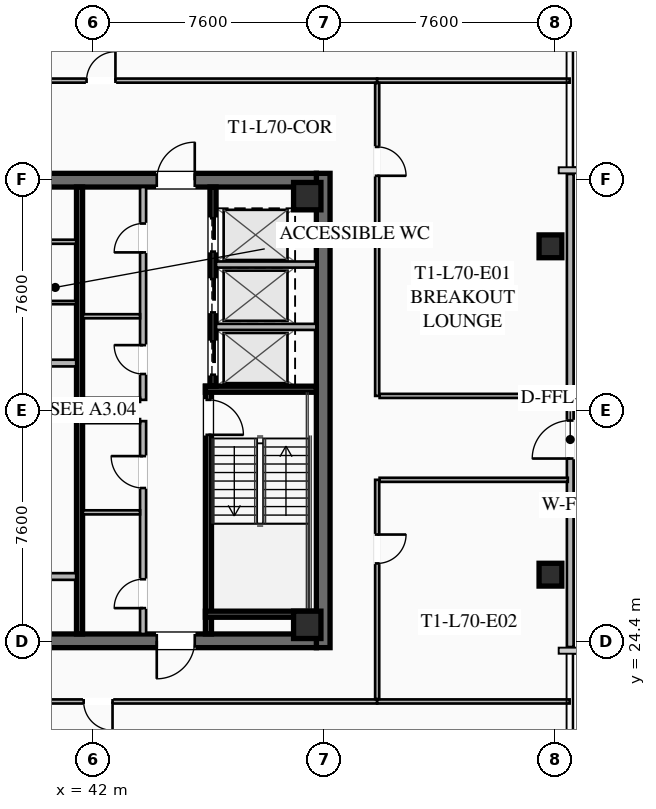
"""IFC4 building model, lengths in metres.
Left out: names, types, materials, properties, quantities, classifications, styles, units other than length and angle.
Written with IfcOpenShell. Run it as: python <this file> out.ifc"""

import sys

from ifc_helpers import new_model, si_unit, direction, frame, frame_2d, origin, origin_2d, place, context, subcontext, project, spatial, rectangle, hollow_rectangle, extrude, element, fill, save


model = new_model("IFC4")
c1 = context("Model", 3, precision=1e-05, world=origin(), true_north=direction((0.0, 1.0)))
c2 = subcontext(c1, "Body", "Model", "MODEL_VIEW")
j1 = project(units=[si_unit("LENGTHUNIT", "METRE"), si_unit("PLANEANGLEUNIT", "RADIAN")], contexts=[c1])
p1 = place(None, origin())
s1 = spatial("IfcSite", under=j1, at=p1, CompositionType="ELEMENT")
p2 = place(p1, origin())
s2 = spatial("IfcBuilding", under=s1, at=p2, CompositionType="ELEMENT")
p3 = place(p2, frame((0.0, 0.0, 259.4)))
s3 = spatial("IfcBuildingStorey", under=s2, at=p3, CompositionType="ELEMENT", Elevation=259.4)
p4 = place(p3, frame((49.575, 39.8, 0.0), z_axis=(0.0, 0.0, 1.0), x_axis=(0.0, -1.0, 0.0)))
e1 = element("IfcWall", 1, at=p4, inside=s3, PredefinedType="SHEAR", context=c2, shape_type="SweptSolid", body=[
    extrude(rectangle(XDim=15.6, YDim=0.45, at=frame_2d((7.8, 0.0))), origin(), (0.0, 0.0, 1.0), 4.0),
])
p5 = place(p3, frame((49.35, 24.425, 0.0), z_axis=(0.0, 0.0, 1.0), x_axis=(-1.0, 0.0, 0.0)))
e2 = element("IfcWall", 2, at=p5, inside=s3, PredefinedType="SHEAR", context=c2, shape_type="SweptSolid", body=[
    extrude(rectangle(XDim=14.7, YDim=0.45, at=frame_2d((7.35, 0.0))), origin(), (0.0, 0.0, 1.0), 4.0),
])
p6 = place(p5, frame((9.05, 0.0, 0.0)))
e3 = element("IfcOpeningElement", 3, at=p6, cuts=e2, PredefinedType="OPENING", context=c2, shape_type="SweptSolid", body=[
    extrude(rectangle(XDim=1.25, YDim=2.25, at=frame_2d((0.625, 1.125))), frame((0.0, 0.235, 0.0), z_axis=(0.0, -1.0, 0.0), x_axis=(1.0, 0.0, 0.0)), (0.0, 0.0, 1.0), 0.47),
])
p7 = place(p5, frame((4.0, 0.0, 0.0)))
e4 = element("IfcOpeningElement", 4, at=p7, cuts=e2, PredefinedType="OPENING", context=c2, shape_type="SweptSolid", body=[
    extrude(rectangle(XDim=1.25, YDim=2.25, at=frame_2d((0.625, 1.125))), frame((0.0, 0.235, 0.0), z_axis=(0.0, -1.0, 0.0), x_axis=(1.0, 0.0, 0.0)), (0.0, 0.0, 1.0), 0.47),
])
p8 = place(p3, frame((34.65, 39.575, 0.0), z_axis=(0.0, 0.0, 1.0), x_axis=(1.0, 0.0, 0.0)))
e5 = element("IfcWall", 5, at=p8, inside=s3, PredefinedType="SHEAR", context=c2, shape_type="SweptSolid", body=[
    extrude(rectangle(XDim=14.7, YDim=0.45, at=frame_2d((7.35, 0.0))), origin(), (0.0, 0.0, 1.0), 4.0),
])
p9 = place(p8, frame((4.4, 0.0, 0.0)))
e6 = element("IfcOpeningElement", 6, at=p9, cuts=e5, PredefinedType="OPENING", context=c2, shape_type="SweptSolid", body=[
    extrude(rectangle(XDim=1.25, YDim=2.25, at=frame_2d((0.625, 1.125))), frame((0.0, 0.235, 0.0), z_axis=(0.0, -1.0, 0.0), x_axis=(1.0, 0.0, 0.0)), (0.0, 0.0, 1.0), 0.47),
])
p10 = place(p8, frame((9.45, 0.0, 0.0)))
e7 = element("IfcOpeningElement", 7, at=p10, cuts=e5, PredefinedType="OPENING", context=c2, shape_type="SweptSolid", body=[
    extrude(rectangle(XDim=1.25, YDim=2.25, at=frame_2d((0.625, 1.125))), frame((0.0, 0.235, 0.0), z_axis=(0.0, -1.0, 0.0), x_axis=(1.0, 0.0, 0.0)), (0.0, 0.0, 1.0), 0.47),
])
for number, where, z_axis, x_axis in (
    (8, (49.05, 24.95, 0.0), (0.0, 0.0, 1.0), (1.0, 0.0, 0.0)),
    (9, (49.05, 39.05, 0.0), (0.0, 0.0, 1.0), (1.0, 0.0, 0.0)),
):
    element("IfcColumn", number, at=place(p3, frame(where, z_axis=z_axis, x_axis=x_axis)), inside=s3, PredefinedType="COLUMN", context=c2, shape_type="SweptSolid", body=[
        extrude(hollow_rectangle(XDim=0.9, YDim=0.9, WallThickness=0.04, at=origin_2d()), origin(), (0.0, 0.0, 1.0), 3.7),
    ])
for number, where, z_axis, x_axis in (
    (10, (57.05, 26.6, 0.0), (0.0, 0.0, 1.0), (1.0, 0.0, 0.0)),
    (11, (57.05, 37.4, 0.0), (0.0, 0.0, 1.0), (1.0, 0.0, 0.0)),
):
    element("IfcColumn", number, at=place(p3, frame(where, z_axis=z_axis, x_axis=x_axis)), inside=s3, PredefinedType="COLUMN", context=c2, shape_type="SweptSolid", body=[
        extrude(hollow_rectangle(XDim=0.75, YDim=0.75, WallThickness=0.032, at=origin_2d()), origin(), (0.0, 0.0, 1.0), 3.7),
    ])
p11 = place(p3, frame((57.7, 24.22, 0.0), z_axis=(0.0, 0.0, 1.0), x_axis=(0.0, 1.0, 0.0)))
e12 = element("IfcWall", 12, at=p11, inside=s3, PredefinedType="SOLIDWALL", context=c2, shape_type="SweptSolid", body=[
    extrude(rectangle(XDim=15.56, YDim=0.22, at=frame_2d((7.78, 0.0))), origin(), (0.0, 0.0, 1.0), 2.659),
])
p12 = place(p11, frame((6.2, 0.0, 0.0)))
e13 = element("IfcOpeningElement", 13, at=p12, cuts=e12, PredefinedType="OPENING", context=c2, shape_type="SweptSolid", body=[
    extrude(rectangle(XDim=1.25, YDim=2.25, at=frame_2d((0.625, 1.125))), frame((0.0, 0.12, 0.0), z_axis=(0.0, -1.0, 0.0), x_axis=(1.0, 0.0, 0.0)), (0.0, 0.0, 1.0), 0.24),
])
p13 = place(p3, frame((45.8, 32.8, 0.0), z_axis=(0.0, 0.0, 1.0), x_axis=(0.0, -1.0, 0.0)))
e14 = element("IfcWall", 14, at=p13, inside=s3, PredefinedType="SHEAR", context=c2, shape_type="SweptSolid", body=[
    extrude(rectangle(XDim=8.15, YDim=0.2, at=frame_2d((4.075, 0.0))), origin(), (0.0, 0.0, 1.0), 3.7),
])
p14 = place(p13, frame((0.45, 0.0, 0.0)))
e15 = element("IfcOpeningElement", 15, at=p14, cuts=e14, PredefinedType="OPENING", context=c2, shape_type="SweptSolid", body=[
    extrude(rectangle(XDim=1.15, YDim=2.2, at=frame_2d((0.575, 1.1))), frame((0.0, 0.11, 0.0), z_axis=(0.0, -1.0, 0.0), x_axis=(1.0, 0.0, 0.0)), (0.0, 0.0, 1.0), 0.22),
])
for number, where, z_axis, x_axis in (
    (16, (45.7, 32.7, 0.0), (0.0, 0.0, 1.0), (1.0, 0.0, 0.0)),
    (17, (45.7, 25.3, 0.0), (0.0, 0.0, 1.0), (1.0, 0.0, 0.0)),
):
    element("IfcWall", number, at=place(p3, frame(where, z_axis=z_axis, x_axis=x_axis)), inside=s3, PredefinedType="SHEAR", context=c2, shape_type="SweptSolid", body=[
        extrude(rectangle(XDim=3.65, YDim=0.2, at=frame_2d((1.825, 0.0))), origin(), (0.0, 0.0, 1.0), 3.7),
    ])
p15 = place(p3, frame((41.56, 24.65, 0.0), z_axis=(0.0, 0.0, 1.0), x_axis=(0.0, 1.0, 0.0)))
e18 = element("IfcWall", 18, at=p15, inside=s3, PredefinedType="SHEAR", context=c2, shape_type="SweptSolid", body=[
    extrude(rectangle(XDim=14.7, YDim=0.2, at=frame_2d((7.35, 0.0))), origin(), (0.0, 0.0, 1.0), 3.7),
])
p16 = place(p3, frame((38.3, 33.56, 0.0), z_axis=(0.0, 0.0, 1.0), x_axis=(1.0, 0.0, 0.0)))
e19 = element("IfcWall", 19, at=p16, inside=s3, PredefinedType="SOLIDWALL", context=c2, shape_type="SweptSolid", body=[
    extrude(rectangle(XDim=3.15, YDim=0.22, at=frame_2d((1.575, 0.0))), origin(), (0.0, 0.0, 1.0), 2.659),
])
p17 = place(p16, frame((1.1, 0.0, 0.0)))
e20 = element("IfcOpeningElement", 20, at=p17, cuts=e19, PredefinedType="OPENING", context=c2, shape_type="SweptSolid", body=[
    extrude(rectangle(XDim=0.95, YDim=2.05, at=frame_2d((0.475, 1.025))), frame((0.0, 0.12, 0.0), z_axis=(0.0, -1.0, 0.0), x_axis=(1.0, 0.0, 0.0)), (0.0, 0.0, 1.0), 0.24),
])
p18 = place(p3, frame((38.3, 26.54, 0.0), z_axis=(0.0, 0.0, 1.0), x_axis=(1.0, 0.0, 0.0)))
e21 = element("IfcWall", 21, at=p18, inside=s3, PredefinedType="SOLIDWALL", context=c2, shape_type="SweptSolid", body=[
    extrude(rectangle(XDim=3.15, YDim=0.22, at=frame_2d((1.575, 0.0))), origin(), (0.0, 0.0, 1.0), 2.659),
])
p19 = place(p18, frame((0.95, 0.0, 0.0)))
e22 = element("IfcOpeningElement", 22, at=p19, cuts=e21, PredefinedType="OPENING", context=c2, shape_type="SweptSolid", body=[
    extrude(rectangle(XDim=1.25, YDim=2.25, at=frame_2d((0.625, 1.125))), frame((0.0, 0.12, 0.0), z_axis=(0.0, -1.0, 0.0), x_axis=(1.0, 0.0, 0.0)), (0.0, 0.0, 1.0), 0.24),
])
p20 = place(p3, frame((45.95, 39.35, 0.0), z_axis=(0.0, 0.0, 1.0), x_axis=(0.0, -1.0, 0.0)))
e23 = element("IfcWall", 23, at=p20, inside=s3, PredefinedType="SHEAR", context=c2, shape_type="SweptSolid", body=[
    extrude(rectangle(XDim=6.55, YDim=0.2, at=frame_2d((3.275, 0.0))), origin(), (0.0, 0.0, 1.0), 3.7),
])
p21 = place(p20, frame((5.075, 0.0, 0.0)))
e24 = element("IfcOpeningElement", 24, at=p21, cuts=e23, PredefinedType="OPENING", context=c2, shape_type="SweptSolid", body=[
    extrude(rectangle(XDim=1.1, YDim=2.2, at=frame_2d((0.55, 1.1))), frame((0.0, 0.11, 0.0), z_axis=(0.0, -1.0, 0.0), x_axis=(1.0, 0.0, 0.0)), (0.0, 0.0, 1.0), 0.22),
])
p22 = place(p20, frame((3.025, 0.0, 0.0)))
e25 = element("IfcOpeningElement", 25, at=p22, cuts=e23, PredefinedType="OPENING", context=c2, shape_type="SweptSolid", body=[
    extrude(rectangle(XDim=1.1, YDim=2.2, at=frame_2d((0.55, 1.1))), frame((0.0, 0.11, 0.0), z_axis=(0.0, -1.0, 0.0), x_axis=(1.0, 0.0, 0.0)), (0.0, 0.0, 1.0), 0.22),
])
p23 = place(p20, frame((1.025, 0.0, 0.0)))
e26 = element("IfcOpeningElement", 26, at=p23, cuts=e23, PredefinedType="OPENING", context=c2, shape_type="SweptSolid", body=[
    extrude(rectangle(XDim=1.1, YDim=2.2, at=frame_2d((0.55, 1.1))), frame((0.0, 0.11, 0.0), z_axis=(0.0, -1.0, 0.0), x_axis=(1.0, 0.0, 0.0)), (0.0, 0.0, 1.0), 0.22),
])
for number, where, z_axis, x_axis in (
    (27, (46.05, 34.75, 0.0), (0.0, 0.0, 1.0), (1.0, 0.0, 0.0)),
    (28, (46.05, 36.8, 0.0), (0.0, 0.0, 1.0), (1.0, 0.0, 0.0)),
):
    element("IfcWall", number, at=place(p3, frame(where, z_axis=z_axis, x_axis=x_axis)), inside=s3, PredefinedType="SOLIDWALL", context=c2, shape_type="SweptSolid", body=[
        extrude(rectangle(XDim=3.3, YDim=0.2, at=frame_2d((1.65, 0.0))), origin(), (0.0, 0.0, 1.0), 3.7),
    ])
p24 = place(p3, frame((38.3, 37.55, 0.0), z_axis=(0.0, 0.0, 1.0), x_axis=(1.0, 0.0, 0.0)))
e29 = element("IfcWall", 29, at=p24, inside=s3, PredefinedType="PARTITIONING", context=c2, shape_type="SweptSolid", body=[
    extrude(rectangle(XDim=3.15, YDim=0.135, at=frame_2d((1.575, 0.0))), origin(), (0.0, 0.0, 1.0), 2.659),
])
p25 = place(p24, frame((1.05, 0.0, 0.0)))
e30 = element("IfcOpeningElement", 30, at=p25, cuts=e29, PredefinedType="OPENING", context=c2, shape_type="SweptSolid", body=[
    extrude(rectangle(XDim=1.05, YDim=2.2, at=frame_2d((0.525, 1.1))), frame((0.0, 0.077, 0.0), z_axis=(0.0, -1.0, 0.0), x_axis=(1.0, 0.0, 0.0)), (0.0, 0.0, 1.0), 0.155),
])
p26 = place(p3, frame((38.3, 35.55, 0.0), z_axis=(0.0, 0.0, 1.0), x_axis=(1.0, 0.0, 0.0)))
e31 = element("IfcWall", 31, at=p26, inside=s3, PredefinedType="PARTITIONING", context=c2, shape_type="SweptSolid", body=[
    extrude(rectangle(XDim=3.15, YDim=0.11, at=frame_2d((1.575, 0.0))), origin(), (0.0, 0.0, 1.0), 2.659),
])
p27 = place(p3, frame((43.65, 24.65, 0.0), z_axis=(0.0, 0.0, 1.0), x_axis=(0.0, 1.0, 0.0)))
e32 = element("IfcWall", 32, at=p27, inside=s3, PredefinedType="SOLIDWALL", context=c2, shape_type="SweptSolid", body=[
    extrude(rectangle(XDim=7.0, YDim=0.2, at=frame_2d((3.5, 0.0))), origin(), (0.0, 0.0, 1.0), 2.659),
])
p28 = place(p27, frame((0.85, 0.0, 0.0)))
e33 = element("IfcOpeningElement", 33, at=p28, cuts=e32, PredefinedType="OPENING", context=c2, shape_type="SweptSolid", body=[
    extrude(rectangle(XDim=0.95, YDim=2.05, at=frame_2d((0.475, 1.025))), frame((0.0, 0.11, 0.0), z_axis=(0.0, -1.0, 0.0), x_axis=(1.0, 0.0, 0.0)), (0.0, 0.0, 1.0), 0.22),
])
p29 = place(p27, frame((4.8, 0.0, 0.0)))
e34 = element("IfcOpeningElement", 34, at=p29, cuts=e32, PredefinedType="OPENING", context=c2, shape_type="SweptSolid", body=[
    extrude(rectangle(XDim=1.05, YDim=2.2, at=frame_2d((0.525, 1.1))), frame((0.0, 0.11, 0.0), z_axis=(0.0, -1.0, 0.0), x_axis=(1.0, 0.0, 0.0)), (0.0, 0.0, 1.0), 0.22),
])
for number, where, z_axis, x_axis in (
    (35, (41.67, 31.65, 0.0), (0.0, 0.0, 1.0), (1.0, 0.0, 0.0)),
    (36, (41.67, 28.65, 0.0), (0.0, 0.0, 1.0), (1.0, 0.0, 0.0)),
):
    element("IfcWall", number, at=place(p3, frame(where, z_axis=z_axis, x_axis=x_axis)), inside=s3, PredefinedType="PARTITIONING", context=c2, shape_type="SweptSolid", body=[
        extrude(rectangle(XDim=1.88, YDim=0.135, at=frame_2d((0.94, 0.0))), origin(), (0.0, 0.0, 1.0), 2.659),
    ])
p30 = place(p3, frame((43.65, 32.35, 0.0), z_axis=(0.0, 0.0, 1.0), x_axis=(0.0, 1.0, 0.0)))
e37 = element("IfcWall", 37, at=p30, inside=s3, PredefinedType="SOLIDWALL", context=c2, shape_type="SweptSolid", body=[
    extrude(rectangle(XDim=7.0, YDim=0.2, at=frame_2d((3.5, 0.0))), origin(), (0.0, 0.0, 1.0), 2.659),
])
p31 = place(p30, frame((0.85, 0.0, 0.0)))
e38 = element("IfcOpeningElement", 38, at=p31, cuts=e37, PredefinedType="OPENING", context=c2, shape_type="SweptSolid", body=[
    extrude(rectangle(XDim=0.95, YDim=2.05, at=frame_2d((0.475, 1.025))), frame((0.0, 0.11, 0.0), z_axis=(0.0, -1.0, 0.0), x_axis=(1.0, 0.0, 0.0)), (0.0, 0.0, 1.0), 0.22),
])
p32 = place(p30, frame((4.85, 0.0, 0.0)))
e39 = element("IfcOpeningElement", 39, at=p32, cuts=e37, PredefinedType="OPENING", context=c2, shape_type="SweptSolid", body=[
    extrude(rectangle(XDim=0.95, YDim=2.05, at=frame_2d((0.475, 1.025))), frame((0.0, 0.11, 0.0), z_axis=(0.0, -1.0, 0.0), x_axis=(1.0, 0.0, 0.0)), (0.0, 0.0, 1.0), 0.22),
])
for number, where, z_axis, x_axis in (
    (40, (41.67, 32.35, 0.0), (0.0, 0.0, 1.0), (1.0, 0.0, 0.0)),
    (41, (41.67, 35.1, 0.0), (0.0, 0.0, 1.0), (1.0, 0.0, 0.0)),
):
    element("IfcWall", number, at=place(p3, frame(where, z_axis=z_axis, x_axis=x_axis)), inside=s3, PredefinedType="PARTITIONING", context=c2, shape_type="SweptSolid", body=[
        extrude(rectangle(XDim=1.88, YDim=0.135, at=frame_2d((0.94, 0.0))), origin(), (0.0, 0.0, 1.0), 2.659),
    ])
p33 = place(p3, frame((28.45, 42.85, 0.0), z_axis=(0.0, 0.0, 1.0), x_axis=(1.0, 0.0, 0.0)))
e42 = element("IfcWall", 42, at=p33, inside=s3, PredefinedType="PARTITIONING", context=c2, shape_type="SweptSolid", body=[
    extrude(rectangle(XDim=22.9, YDim=0.135, at=frame_2d((11.45, 0.0))), origin(), (0.0, 0.0, 1.0), 2.659),
])
p34 = place(p33, frame((0.3, 0.0, 0.0)))
e43 = element("IfcOpeningElement", 43, at=p34, cuts=e42, PredefinedType="OPENING", context=c2, shape_type="SweptSolid", body=[
    extrude(rectangle(XDim=0.95, YDim=2.05, at=frame_2d((0.475, 1.025))), frame((0.0, 0.077, 0.0), z_axis=(0.0, -1.0, 0.0), x_axis=(1.0, 0.0, 0.0)), (0.0, 0.0, 1.0), 0.155),
])
p35 = place(p33, frame((13.341, 0.0, 0.0)))
e44 = element("IfcOpeningElement", 44, at=p35, cuts=e42, PredefinedType="OPENING", context=c2, shape_type="SweptSolid", body=[
    extrude(rectangle(XDim=0.95, YDim=2.05, at=frame_2d((0.475, 1.025))), frame((0.0, 0.077, 0.0), z_axis=(0.0, -1.0, 0.0), x_axis=(1.0, 0.0, 0.0)), (0.0, 0.0, 1.0), 0.155),
])
p36 = place(p3, frame((51.35, 42.85, 0.0), z_axis=(0.0, 0.0, 1.0), x_axis=(1.0, 0.0, 0.0)))
e45 = element("IfcWall", 45, at=p36, inside=s3, PredefinedType="PARTITIONING", context=c2, shape_type="SweptSolid", body=[
    extrude(rectangle(XDim=6.33, YDim=0.135, at=frame_2d((3.165, 0.0))), origin(), (0.0, 0.0, 1.0), 2.659),
])
p37 = place(p3, frame((51.35, 22.43, 0.0), z_axis=(0.0, 0.0, 1.0), x_axis=(-1.0, 0.0, 0.0)))
e46 = element("IfcWall", 46, at=p37, inside=s3, PredefinedType="PARTITIONING", context=c2, shape_type="SweptSolid", body=[
    extrude(rectangle(XDim=22.9, YDim=0.135, at=frame_2d((11.45, 0.0))), origin(), (0.0, 0.0, 1.0), 2.659),
])
p38 = place(p37, frame((8.705, 0.0, 0.0)))
e47 = element("IfcOpeningElement", 47, at=p38, cuts=e46, PredefinedType="OPENING", context=c2, shape_type="SweptSolid", body=[
    extrude(rectangle(XDim=0.95, YDim=2.05, at=frame_2d((0.475, 1.025))), frame((0.0, 0.077, 0.0), z_axis=(0.0, -1.0, 0.0), x_axis=(1.0, 0.0, 0.0)), (0.0, 0.0, 1.0), 0.155),
])
p39 = place(p3, frame((51.35, 22.43, 0.0), z_axis=(0.0, 0.0, 1.0), x_axis=(1.0, 0.0, 0.0)))
e48 = element("IfcWall", 48, at=p39, inside=s3, PredefinedType="PARTITIONING", context=c2, shape_type="SweptSolid", body=[
    extrude(rectangle(XDim=6.33, YDim=0.135, at=frame_2d((3.165, 0.0))), origin(), (0.0, 0.0, 1.0), 2.659),
])
p40 = place(p3, frame((51.35, 42.77, 0.0), z_axis=(0.0, 0.0, 1.0), x_axis=(0.0, -1.0, 0.0)))
e49 = element("IfcWall", 49, at=p40, inside=s3, PredefinedType="PARTITIONING", context=c2, shape_type="SweptSolid", body=[
    extrude(rectangle(XDim=10.29, YDim=0.135, at=frame_2d((5.145, 0.0))), origin(), (0.0, 0.0, 1.0), 2.659),
])
p41 = place(p40, frame((2.1, 0.0, 0.0)))
e50 = element("IfcOpeningElement", 50, at=p41, cuts=e49, PredefinedType="OPENING", context=c2, shape_type="SweptSolid", body=[
    extrude(rectangle(XDim=0.95, YDim=2.05, at=frame_2d((0.475, 1.025))), frame((0.0, 0.077, 0.0), z_axis=(0.0, -1.0, 0.0), x_axis=(1.0, 0.0, 0.0)), (0.0, 0.0, 1.0), 0.155),
])
p42 = place(p3, frame((51.35, 29.72, 0.0), z_axis=(0.0, 0.0, 1.0), x_axis=(0.0, -1.0, 0.0)))
e51 = element("IfcWall", 51, at=p42, inside=s3, PredefinedType="PARTITIONING", context=c2, shape_type="SweptSolid", body=[
    extrude(rectangle(XDim=7.21, YDim=0.135, at=frame_2d((3.605, 0.0))), origin(), (0.0, 0.0, 1.0), 2.659),
])
p43 = place(p42, frame((1.8, 0.0, 0.0)))
e52 = element("IfcOpeningElement", 52, at=p43, cuts=e51, PredefinedType="OPENING", context=c2, shape_type="SweptSolid", body=[
    extrude(rectangle(XDim=0.95, YDim=2.05, at=frame_2d((0.475, 1.025))), frame((0.0, 0.077, 0.0), z_axis=(0.0, -1.0, 0.0), x_axis=(1.0, 0.0, 0.0)), (0.0, 0.0, 1.0), 0.155),
])
for number, where, z_axis, x_axis in (
    (53, (51.43, 32.48, 0.0), (0.0, 0.0, 1.0), (1.0, 0.0, 0.0)),
    (54, (57.62, 29.72, 0.0), (0.0, 0.0, 1.0), (-1.0, 0.0, 0.0)),
):
    element("IfcWall", number, at=place(p3, frame(where, z_axis=z_axis, x_axis=x_axis)), inside=s3, PredefinedType="PARTITIONING", context=c2, shape_type="SweptSolid", body=[
        extrude(rectangle(XDim=6.19, YDim=0.135, at=frame_2d((3.095, 0.0))), origin(), (0.0, 0.0, 1.0), 2.659),
    ])
p44 = place(p12, origin())
e55 = element("IfcDoor", 55, at=p44, inside=s3, OperationType="SINGLE_SWING_LEFT", PredefinedType="DOOR", context=c2, shape_type="SweptSolid", body=[
    extrude(rectangle(XDim=1.25, YDim=2.25, at=frame_2d((0.625, 1.125))), frame((0.0, 0.025, 0.0), z_axis=(0.0, -1.0, 0.0), x_axis=(1.0, 0.0, 0.0)), (0.0, 0.0, 1.0), 0.05),
])
fill(e13, e55)
p45 = place(p10, origin())
e56 = element("IfcDoor", 56, at=p45, inside=s3, OperationType="SINGLE_SWING_RIGHT", PredefinedType="DOOR", context=c2, shape_type="SweptSolid", body=[
    extrude(rectangle(XDim=1.25, YDim=2.25, at=frame_2d((0.625, 1.125))), frame((0.0, 0.025, 0.0), z_axis=(0.0, -1.0, 0.0), x_axis=(1.0, 0.0, 0.0)), (0.0, 0.0, 1.0), 0.05),
])
fill(e7, e56)
p46 = place(p7, origin())
e57 = element("IfcDoor", 57, at=p46, inside=s3, OperationType="SINGLE_SWING_RIGHT", PredefinedType="DOOR", context=c2, shape_type="SweptSolid", body=[
    extrude(rectangle(XDim=1.25, YDim=2.25, at=frame_2d((0.625, 1.125))), frame((0.0, 0.025, 0.0), z_axis=(0.0, -1.0, 0.0), x_axis=(1.0, 0.0, 0.0)), (0.0, 0.0, 1.0), 0.05),
])
fill(e4, e57)
p47 = place(p14, origin())
e58 = element("IfcDoor", 58, at=p47, inside=s3, OperationType="SINGLE_SWING_RIGHT", PredefinedType="DOOR", context=c2, shape_type="SweptSolid", body=[
    extrude(rectangle(XDim=1.15, YDim=2.2, at=frame_2d((0.575, 1.1))), frame((0.0, 0.025, 0.0), z_axis=(0.0, -1.0, 0.0), x_axis=(1.0, 0.0, 0.0)), (0.0, 0.0, 1.0), 0.05),
])
fill(e15, e58)
p48 = place(p28, origin())
e59 = element("IfcDoor", 59, at=p48, inside=s3, OperationType="SINGLE_SWING_LEFT", PredefinedType="DOOR", context=c2, shape_type="SweptSolid", body=[
    extrude(rectangle(XDim=0.95, YDim=2.05, at=frame_2d((0.475, 1.025))), frame((0.0, 0.025, 0.0), z_axis=(0.0, -1.0, 0.0), x_axis=(1.0, 0.0, 0.0)), (0.0, 0.0, 1.0), 0.05),
])
fill(e33, e59)
p49 = place(p29, origin())
e60 = element("IfcDoor", 60, at=p49, inside=s3, OperationType="SINGLE_SWING_RIGHT", PredefinedType="DOOR", context=c2, shape_type="SweptSolid", body=[
    extrude(rectangle(XDim=1.05, YDim=2.2, at=frame_2d((0.525, 1.1))), frame((0.0, 0.025, 0.0), z_axis=(0.0, -1.0, 0.0), x_axis=(1.0, 0.0, 0.0)), (0.0, 0.0, 1.0), 0.05),
])
fill(e34, e60)
p50 = place(p31, origin())
e61 = element("IfcDoor", 61, at=p50, inside=s3, OperationType="SINGLE_SWING_RIGHT", PredefinedType="DOOR", context=c2, shape_type="SweptSolid", body=[
    extrude(rectangle(XDim=0.95, YDim=2.05, at=frame_2d((0.475, 1.025))), frame((0.0, 0.025, 0.0), z_axis=(0.0, -1.0, 0.0), x_axis=(1.0, 0.0, 0.0)), (0.0, 0.0, 1.0), 0.05),
])
fill(e38, e61)
p51 = place(p32, origin())
e62 = element("IfcDoor", 62, at=p51, inside=s3, OperationType="SINGLE_SWING_LEFT", PredefinedType="DOOR", context=c2, shape_type="SweptSolid", body=[
    extrude(rectangle(XDim=0.95, YDim=2.05, at=frame_2d((0.475, 1.025))), frame((0.0, 0.025, 0.0), z_axis=(0.0, -1.0, 0.0), x_axis=(1.0, 0.0, 0.0)), (0.0, 0.0, 1.0), 0.05),
])
fill(e39, e62)
p52 = place(p35, origin())
e63 = element("IfcDoor", 63, at=p52, inside=s3, OperationType="SINGLE_SWING_RIGHT", PredefinedType="DOOR", context=c2, shape_type="SweptSolid", body=[
    extrude(rectangle(XDim=0.95, YDim=2.05, at=frame_2d((0.475, 1.025))), frame((0.0, 0.025, 0.0), z_axis=(0.0, -1.0, 0.0), x_axis=(1.0, 0.0, 0.0)), (0.0, 0.0, 1.0), 0.05),
])
fill(e44, e63)
p53 = place(p38, origin())
e64 = element("IfcDoor", 64, at=p53, inside=s3, OperationType="SINGLE_SWING_LEFT", PredefinedType="DOOR", context=c2, shape_type="SweptSolid", body=[
    extrude(rectangle(XDim=0.95, YDim=2.05, at=frame_2d((0.475, 1.025))), frame((0.0, 0.025, 0.0), z_axis=(0.0, -1.0, 0.0), x_axis=(1.0, 0.0, 0.0)), (0.0, 0.0, 1.0), 0.05),
])
fill(e47, e64)
p54 = place(p41, origin())
e65 = element("IfcDoor", 65, at=p54, inside=s3, OperationType="SINGLE_SWING_RIGHT", PredefinedType="DOOR", context=c2, shape_type="SweptSolid", body=[
    extrude(rectangle(XDim=0.95, YDim=2.05, at=frame_2d((0.475, 1.025))), frame((0.0, 0.025, 0.0), z_axis=(0.0, -1.0, 0.0), x_axis=(1.0, 0.0, 0.0)), (0.0, 0.0, 1.0), 0.05),
])
fill(e50, e65)
p55 = place(p43, origin())
e66 = element("IfcDoor", 66, at=p55, inside=s3, OperationType="SINGLE_SWING_LEFT", PredefinedType="DOOR", context=c2, shape_type="SweptSolid", body=[
    extrude(rectangle(XDim=0.95, YDim=2.05, at=frame_2d((0.475, 1.025))), frame((0.0, 0.025, 0.0), z_axis=(0.0, -1.0, 0.0), x_axis=(1.0, 0.0, 0.0)), (0.0, 0.0, 1.0), 0.05),
])
fill(e52, e66)
p56 = place(p21, origin())
e67 = element("IfcDoor", 67, at=p56, inside=s3, OperationType="SLIDING_TO_LEFT", PredefinedType="DOOR", context=c2, shape_type="SweptSolid", body=[
    extrude(rectangle(XDim=1.1, YDim=2.2, at=frame_2d((0.55, 1.1))), frame((0.0, 0.025, 0.0), z_axis=(0.0, -1.0, 0.0), x_axis=(1.0, 0.0, 0.0)), (0.0, 0.0, 1.0), 0.05),
])
fill(e24, e67)
p57 = place(p22, origin())
e68 = element("IfcDoor", 68, at=p57, inside=s3, OperationType="SLIDING_TO_LEFT", PredefinedType="DOOR", context=c2, shape_type="SweptSolid", body=[
    extrude(rectangle(XDim=1.1, YDim=2.2, at=frame_2d((0.55, 1.1))), frame((0.0, 0.025, 0.0), z_axis=(0.0, -1.0, 0.0), x_axis=(1.0, 0.0, 0.0)), (0.0, 0.0, 1.0), 0.05),
])
fill(e25, e68)
p58 = place(p23, origin())
e69 = element("IfcDoor", 69, at=p58, inside=s3, OperationType="SLIDING_TO_LEFT", PredefinedType="DOOR", context=c2, shape_type="SweptSolid", body=[
    extrude(rectangle(XDim=1.1, YDim=2.2, at=frame_2d((0.55, 1.1))), frame((0.0, 0.025, 0.0), z_axis=(0.0, -1.0, 0.0), x_axis=(1.0, 0.0, 0.0)), (0.0, 0.0, 1.0), 0.05),
])
fill(e26, e69)
save(model, sys.argv[1])
